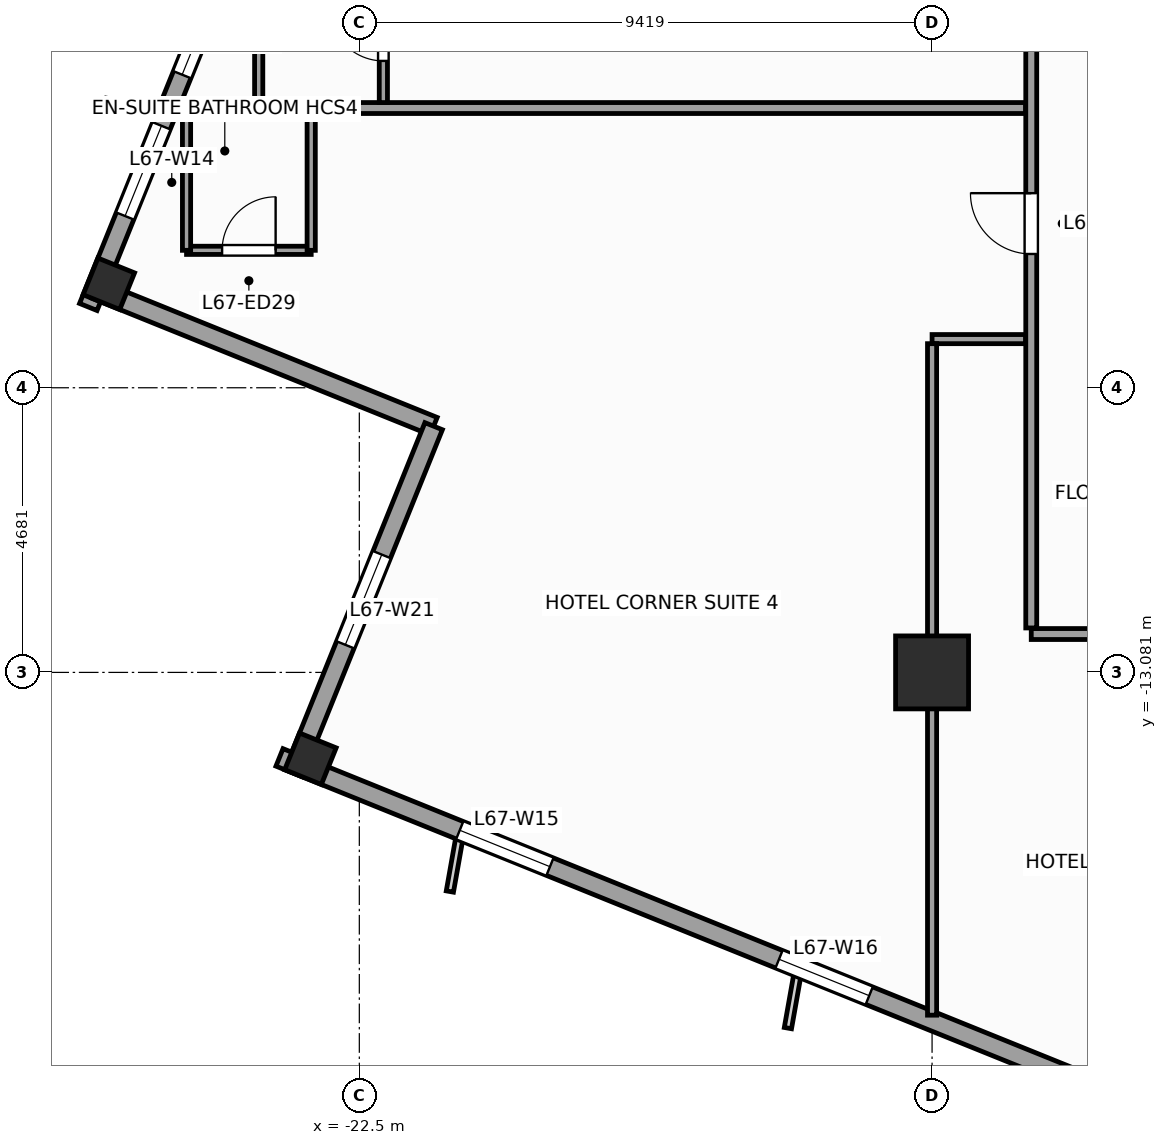
"""IFC4 building model, lengths in metres.
Left out: names, types, materials, properties, quantities, classifications, styles, units other than length and angle.
Written with IfcOpenShell. Run it as: python <this file> out.ifc"""

import sys

from ifc_helpers import new_model, si_unit, direction, frame, frame_2d, origin, origin_2d, place, context, subcontext, project, spatial, rectangle, extrude, source, transform, mapped, element, fill, save


model = new_model("IFC4")
c1 = context("Model", 3, precision=1e-05, world=origin(), true_north=direction((0.0, 1.0)))
c2 = subcontext(c1, "Body", "Model", "MODEL_VIEW")
j1 = project(units=[si_unit("LENGTHUNIT", "METRE"), si_unit("PLANEANGLEUNIT", "RADIAN")], contexts=[c1])
p1 = place(None, origin())
s1 = spatial("IfcSite", under=j1, at=p1, CompositionType="ELEMENT")
p2 = place(p1, origin())
s2 = spatial("IfcBuilding", under=s1, at=p2, CompositionType="ELEMENT")
p3 = place(p2, frame((0.0, 0.0, 276.0)))
s3 = spatial("IfcBuildingStorey", under=s2, at=p3, CompositionType="ELEMENT", Elevation=276.0)
m1 = source(origin(), c2, "Body", "SweptSolid", [
    extrude(rectangle(XDim=1.2, YDim=1.2, at=origin_2d()), origin(), (0.0, 0.0, 1.0), 3.6),
])
p4 = place(p3, frame((-13.081, -13.081, 0.0), z_axis=(0.0, 0.0, 1.0), x_axis=(1.0, 0.0, 0.0)))
e1 = element("IfcColumn", 1, at=p4, inside=s3, PredefinedType="COLUMN", context=c2, shape_type="MappedRepresentation", body=[
    mapped(m1, transform((0.0, 0.0, 0.0), scale=1.0)),
])
m2 = source(origin(), c2, "Body", "SweptSolid", [
    extrude(rectangle(XDim=0.65, YDim=0.65, at=origin_2d()), origin(), (0.0, 0.0, 1.0), 3.6),
])
for number, where, z_axis, x_axis in (
    (2, (-26.62, -6.69, 0.0), (0.0, 0.0, 1.0), (0.375, 0.927, 0.0)),
    (3, (-23.304, -14.501, 0.0), (0.0, 0.0, 1.0), (0.375, 0.927, 0.0)),
):
    element("IfcColumn", number, at=place(p3, frame(where, z_axis=z_axis, x_axis=x_axis)), inside=s3, PredefinedType="COLUMN", context=c2, shape_type="MappedRepresentation", body=[
        mapped(m2, transform((0.0, 0.0, 0.0), scale=1.0)),
    ])
p5 = place(p3, frame((-14.479, 23.813, 0.0), z_axis=(0.0, 0.0, 1.0), x_axis=(-0.374609557019, -0.927182657188, 0.0)))
e4 = element("IfcWall", 4, at=p5, inside=s3, PredefinedType="STANDARD", context=c2, shape_type="SweptSolid", body=[
    extrude(rectangle(XDim=33.31, YDim=0.31, at=frame_2d((16.655, 0.0))), origin(), (0.0, 0.0, 1.0), 2.75),
])
p6 = place(p5, frame((3.197, 0.0, 0.47)))
e5 = element("IfcOpeningElement", 5, at=p6, cuts=e4, PredefinedType="OPENING", context=c2, shape_type="SweptSolid", body=[
    extrude(rectangle(XDim=1.6, YDim=2.1, at=frame_2d((0.8, 1.05))), frame((0.0, 0.165, 0.0), z_axis=(0.0, -1.0, 0.0), x_axis=(1.0, 0.0, 0.0)), (0.0, 0.0, 1.0), 0.33),
])
p7 = place(p5, frame((8.86, 0.0, 0.47)))
e6 = element("IfcOpeningElement", 6, at=p7, cuts=e4, PredefinedType="OPENING", context=c2, shape_type="SweptSolid", body=[
    extrude(rectangle(XDim=1.6, YDim=2.1, at=frame_2d((0.8, 1.05))), frame((0.0, 0.165, 0.0), z_axis=(0.0, -1.0, 0.0), x_axis=(1.0, 0.0, 0.0)), (0.0, 0.0, 1.0), 0.33),
])
p8 = place(p5, frame((14.439, 0.0, 0.47)))
e7 = element("IfcOpeningElement", 7, at=p8, cuts=e4, PredefinedType="OPENING", context=c2, shape_type="SweptSolid", body=[
    extrude(rectangle(XDim=1.6, YDim=2.1, at=frame_2d((0.8, 1.05))), frame((0.0, 0.165, 0.0), z_axis=(0.0, -1.0, 0.0), x_axis=(1.0, 0.0, 0.0)), (0.0, 0.0, 1.0), 0.33),
])
p9 = place(p5, frame((23.351, 0.0, 0.47)))
e8 = element("IfcOpeningElement", 8, at=p9, cuts=e4, PredefinedType="OPENING", context=c2, shape_type="SweptSolid", body=[
    extrude(rectangle(XDim=1.6, YDim=2.1, at=frame_2d((0.8, 1.05))), frame((0.0, 0.165, 0.0), z_axis=(0.0, -1.0, 0.0), x_axis=(1.0, 0.0, 0.0)), (0.0, 0.0, 1.0), 0.33),
])
p10 = place(p5, frame((30.097, 0.0, 0.47)))
e9 = element("IfcOpeningElement", 9, at=p10, cuts=e4, PredefinedType="OPENING", context=c2, shape_type="SweptSolid", body=[
    extrude(rectangle(XDim=1.6, YDim=2.1, at=frame_2d((0.8, 1.05))), frame((0.0, 0.165, 0.0), z_axis=(0.0, -1.0, 0.0), x_axis=(1.0, 0.0, 0.0)), (0.0, 0.0, 1.0), 0.33),
])
p11 = place(p5, frame((27.59, 0.0, 0.47)))
e10 = element("IfcOpeningElement", 10, at=p11, cuts=e4, PredefinedType="OPENING", context=c2, shape_type="SweptSolid", body=[
    extrude(rectangle(XDim=1.6, YDim=2.1, at=frame_2d((0.8, 1.05))), frame((0.0, 0.165, 0.0), z_axis=(0.0, -1.0, 0.0), x_axis=(1.0, 0.0, 0.0)), (0.0, 0.0, 1.0), 0.33),
])
p12 = place(p3, frame((-26.841, -6.784, 0.0), z_axis=(0.0, 0.0, 1.0), x_axis=(0.927171722085, -0.374636620962, 0.0)))
e11 = element("IfcWall", 11, at=p12, inside=s3, PredefinedType="STANDARD", context=c2, shape_type="SweptSolid", body=[
    extrude(rectangle(XDim=6.0, YDim=0.31, at=frame_2d((3.0, 0.0))), origin(), (0.0, 0.0, 1.0), 2.65),
])
p13 = place(p3, frame((-21.278, -9.032, 0.0), z_axis=(0.0, 0.0, 1.0), x_axis=(-0.374602739196, -0.927185411764, 0.0)))
e12 = element("IfcWall", 12, at=p13, inside=s3, PredefinedType="STANDARD", context=c2, shape_type="SweptSolid", body=[
    extrude(rectangle(XDim=6.155, YDim=0.31, at=frame_2d((3.078, 0.0))), origin(), (0.0, 0.0, 1.0), 3.35),
])
p14 = place(p13, frame((2.278, 0.0, 0.47)))
e13 = element("IfcOpeningElement", 13, at=p14, cuts=e12, PredefinedType="OPENING", context=c2, shape_type="SweptSolid", body=[
    extrude(rectangle(XDim=1.6, YDim=2.1, at=frame_2d((0.8, 1.05))), frame((0.0, 0.165, 0.0), z_axis=(0.0, -1.0, 0.0), x_axis=(1.0, 0.0, 0.0)), (0.0, 0.0, 1.0), 0.33),
])
p15 = place(p3, frame((-23.813, -14.479, 0.0), z_axis=(0.0, 0.0, 1.0), x_axis=(0.927182657188, -0.374609557019, 0.0)))
e14 = element("IfcWall", 14, at=p15, inside=s3, PredefinedType="STANDARD", context=c2, shape_type="SweptSolid", body=[
    extrude(rectangle(XDim=33.31, YDim=0.31, at=frame_2d((16.655, 0.0))), origin(), (0.0, 0.0, 1.0), 2.75),
])
p16 = place(p15, frame((21.73, 0.0, 0.0)))
e15 = element("IfcOpeningElement", 15, at=p16, cuts=e14, PredefinedType="OPENING", context=c2, shape_type="SweptSolid", body=[
    extrude(rectangle(XDim=1.05, YDim=2.25, at=frame_2d((0.525, 1.125))), frame((0.0, 0.165, 0.0), z_axis=(0.0, -1.0, 0.0), x_axis=(1.0, 0.0, 0.0)), (0.0, 0.0, 1.0), 0.33),
])
p17 = place(p15, frame((3.197, 0.0, 0.47)))
e16 = element("IfcOpeningElement", 16, at=p17, cuts=e14, PredefinedType="OPENING", context=c2, shape_type="SweptSolid", body=[
    extrude(rectangle(XDim=1.6, YDim=2.1, at=frame_2d((0.8, 1.05))), frame((0.0, 0.165, 0.0), z_axis=(0.0, -1.0, 0.0), x_axis=(1.0, 0.0, 0.0)), (0.0, 0.0, 1.0), 0.33),
])
p18 = place(p15, frame((8.86, 0.0, 0.47)))
e17 = element("IfcOpeningElement", 17, at=p18, cuts=e14, PredefinedType="OPENING", context=c2, shape_type="SweptSolid", body=[
    extrude(rectangle(XDim=1.6, YDim=2.1, at=frame_2d((0.8, 1.05))), frame((0.0, 0.165, 0.0), z_axis=(0.0, -1.0, 0.0), x_axis=(1.0, 0.0, 0.0)), (0.0, 0.0, 1.0), 0.33),
])
p19 = place(p15, frame((14.439, 0.0, 0.47)))
e18 = element("IfcOpeningElement", 18, at=p19, cuts=e14, PredefinedType="OPENING", context=c2, shape_type="SweptSolid", body=[
    extrude(rectangle(XDim=1.6, YDim=2.1, at=frame_2d((0.8, 1.05))), frame((0.0, 0.165, 0.0), z_axis=(0.0, -1.0, 0.0), x_axis=(1.0, 0.0, 0.0)), (0.0, 0.0, 1.0), 0.33),
])
p20 = place(p15, frame((27.847, 0.0, 0.47)))
e19 = element("IfcOpeningElement", 19, at=p20, cuts=e14, PredefinedType="OPENING", context=c2, shape_type="SweptSolid", body=[
    extrude(rectangle(XDim=1.6, YDim=2.1, at=frame_2d((0.8, 1.05))), frame((0.0, 0.165, 0.0), z_axis=(0.0, -1.0, 0.0), x_axis=(1.0, 0.0, 0.0)), (0.0, 0.0, 1.0), 0.33),
])
p21 = place(p3, frame((-11.45, -12.45, 0.0), z_axis=(0.0, 0.0, 1.0), x_axis=(1.0, 0.0, 0.0)))
e20 = element("IfcWall", 20, at=p21, inside=s3, PredefinedType="PARTITIONING", context=c2, shape_type="SweptSolid", body=[
    extrude(rectangle(XDim=21.75, YDim=0.18, at=frame_2d((10.875, 0.0))), origin(), (0.0, 0.0, 1.0), 3.35),
])
p22 = place(p21, frame((12.436, 0.0, 0.0)))
e21 = element("IfcOpeningElement", 21, at=p22, cuts=e20, PredefinedType="OPENING", context=c2, shape_type="SweptSolid", body=[
    extrude(rectangle(XDim=0.95, YDim=2.1, at=frame_2d((0.475, 1.05))), frame((0.0, 0.1, 0.0), z_axis=(0.0, -1.0, 0.0), x_axis=(1.0, 0.0, 0.0)), (0.0, 0.0, 1.0), 0.2),
])
p23 = place(p21, frame((18.186, 0.0, 0.0)))
e22 = element("IfcOpeningElement", 22, at=p23, cuts=e20, PredefinedType="OPENING", context=c2, shape_type="SweptSolid", body=[
    extrude(rectangle(XDim=1.0, YDim=2.15, at=frame_2d((0.5, 1.075))), frame((0.0, 0.1, 0.0), z_axis=(0.0, -1.0, 0.0), x_axis=(1.0, 0.0, 0.0)), (0.0, 0.0, 1.0), 0.2),
])
p24 = place(p21, frame((14.5, 0.0, 0.0)))
e23 = element("IfcOpeningElement", 23, at=p24, cuts=e20, PredefinedType="OPENING", context=c2, shape_type="SweptSolid", body=[
    extrude(rectangle(XDim=1.0, YDim=2.15, at=frame_2d((0.5, 1.075))), frame((0.0, 0.1, 0.0), z_axis=(0.0, -1.0, 0.0), x_axis=(1.0, 0.0, 0.0)), (0.0, 0.0, 1.0), 0.2),
])
p25 = place(p21, frame((8.7, 0.0, 0.0)))
e24 = element("IfcOpeningElement", 24, at=p25, cuts=e20, PredefinedType="OPENING", context=c2, shape_type="SweptSolid", body=[
    extrude(rectangle(XDim=1.0, YDim=2.15, at=frame_2d((0.5, 1.075))), frame((0.0, 0.1, 0.0), z_axis=(0.0, -1.0, 0.0), x_axis=(1.0, 0.0, 0.0)), (0.0, 0.0, 1.0), 0.2),
])
p26 = place(p21, frame((3.139, 0.0, 0.0)))
e25 = element("IfcOpeningElement", 25, at=p26, cuts=e20, PredefinedType="OPENING", context=c2, shape_type="SweptSolid", body=[
    extrude(rectangle(XDim=1.0, YDim=2.15, at=frame_2d((0.5, 1.075))), frame((0.0, 0.1, 0.0), z_axis=(0.0, -1.0, 0.0), x_axis=(1.0, 0.0, 0.0)), (0.0, 0.0, 1.0), 0.2),
])
p27 = place(p3, frame((-11.45, -12.35, 0.0), z_axis=(0.0, 0.0, 1.0), x_axis=(0.0, 1.0, 0.0)))
e26 = element("IfcWall", 26, at=p27, inside=s3, PredefinedType="PARTITIONING", context=c2, shape_type="SweptSolid", body=[
    extrude(rectangle(XDim=23.7, YDim=0.18, at=frame_2d((11.85, 0.0))), origin(), (0.0, 0.0, 1.0), 3.35),
])
p28 = place(p27, frame((13.75, 0.0, 0.0)))
e27 = element("IfcOpeningElement", 27, at=p28, cuts=e26, PredefinedType="OPENING", context=c2, shape_type="SweptSolid", body=[
    extrude(rectangle(XDim=1.0, YDim=2.15, at=frame_2d((0.5, 1.075))), frame((0.0, 0.1, 0.0), z_axis=(0.0, -1.0, 0.0), x_axis=(1.0, 0.0, 0.0)), (0.0, 0.0, 1.0), 0.2),
])
p29 = place(p27, frame((17.55, 0.0, 0.0)))
e28 = element("IfcOpeningElement", 28, at=p29, cuts=e26, PredefinedType="OPENING", context=c2, shape_type="SweptSolid", body=[
    extrude(rectangle(XDim=1.0, YDim=2.15, at=frame_2d((0.5, 1.075))), frame((0.0, 0.1, 0.0), z_axis=(0.0, -1.0, 0.0), x_axis=(1.0, 0.0, 0.0)), (0.0, 0.0, 1.0), 0.2),
])
p30 = place(p27, frame((6.15, 0.0, 0.0)))
e29 = element("IfcOpeningElement", 29, at=p30, cuts=e26, PredefinedType="OPENING", context=c2, shape_type="SweptSolid", body=[
    extrude(rectangle(XDim=1.0, YDim=2.15, at=frame_2d((0.5, 1.075))), frame((0.0, 0.1, 0.0), z_axis=(0.0, -1.0, 0.0), x_axis=(1.0, 0.0, 0.0)), (0.0, 0.0, 1.0), 0.2),
])
p31 = place(p27, frame((9.95, 0.0, 0.0)))
e30 = element("IfcOpeningElement", 30, at=p31, cuts=e26, PredefinedType="OPENING", context=c2, shape_type="SweptSolid", body=[
    extrude(rectangle(XDim=1.0, YDim=2.15, at=frame_2d((0.5, 1.075))), frame((0.0, 0.1, 0.0), z_axis=(0.0, -1.0, 0.0), x_axis=(1.0, 0.0, 0.0)), (0.0, 0.0, 1.0), 0.2),
])
p32 = place(p3, frame((-11.545, -3.8, 0.0), z_axis=(0.0, 0.0, 1.0), x_axis=(-1.0, 0.0, 0.0)))
e31 = element("IfcWall", 31, at=p32, inside=s3, PredefinedType="PARTITIONING", context=c2, shape_type="SweptSolid", body=[
    extrude(rectangle(XDim=13.993, YDim=0.18, at=frame_2d((6.997, 0.0))), origin(), (0.0, 0.0, 1.0), 3.35),
])
p33 = place(p3, frame((-11.545, -7.6, 0.0), z_axis=(0.0, 0.0, 1.0), x_axis=(-1.0, 0.0, 0.0)))
e32 = element("IfcWall", 32, at=p33, inside=s3, PredefinedType="PARTITIONING", context=c2, shape_type="SweptSolid", body=[
    extrude(rectangle(XDim=1.536, YDim=0.15, at=frame_2d((0.768, 0.0))), origin(), (0.0, 0.0, 1.0), 3.35),
])
p34 = place(p3, frame((-13.081, -7.675, 0.0), z_axis=(0.0, 0.0, 1.0), x_axis=(0.0, -1.0, 0.0)))
e33 = element("IfcWall", 33, at=p34, inside=s3, PredefinedType="PARTITIONING", context=c2, shape_type="SweptSolid", body=[
    extrude(rectangle(XDim=11.043, YDim=0.15, at=frame_2d((5.521, 0.0))), origin(), (0.0, 0.0, 1.0), 2.45),
])
p35 = place(p3, frame((-25.342, -6.14, 0.0), z_axis=(0.0, 0.0, 1.0), x_axis=(1.0, 0.0, 0.0)))
e34 = element("IfcWall", 34, at=p35, inside=s3, PredefinedType="PARTITIONING", context=c2, shape_type="SweptSolid", body=[
    extrude(rectangle(XDim=2.05, YDim=0.135, at=frame_2d((1.025, 0.0))), origin(), (0.0, 0.0, 1.0), 3.35),
])
p36 = place(p35, frame((0.585, 0.0, 0.0)))
e35 = element("IfcOpeningElement", 35, at=p36, cuts=e34, PredefinedType="OPENING", context=c2, shape_type="SweptSolid", body=[
    extrude(rectangle(XDim=0.88, YDim=2.1, at=frame_2d((0.44, 1.05))), frame((0.0, 0.078, 0.0), z_axis=(0.0, -1.0, 0.0), x_axis=(1.0, 0.0, 0.0)), (0.0, 0.0, 1.0), 0.155),
])
p37 = place(p3, frame((-23.292, -6.14, 0.0), z_axis=(0.0, 0.0, 1.0), x_axis=(0.0, 1.0, 0.0)))
e36 = element("IfcWall", 36, at=p37, inside=s3, PredefinedType="PARTITIONING", context=c2, shape_type="SweptSolid", body=[
    extrude(rectangle(XDim=2.25, YDim=0.135, at=frame_2d((1.125, 0.0))), origin(), (0.0, 0.0, 1.0), 2.95),
])
p38 = place(p3, frame((-25.342, -6.14, 0.0), z_axis=(0.0, 0.0, 1.0), x_axis=(0.0, 1.0, 0.0)))
e37 = element("IfcWall", 37, at=p38, inside=s3, PredefinedType="PARTITIONING", context=c2, shape_type="SweptSolid", body=[
    extrude(rectangle(XDim=2.25, YDim=0.135, at=frame_2d((1.125, 0.0))), origin(), (0.0, 0.0, 1.0), 2.75),
])
p39 = place(p3, frame((-22.105, -3.71, 0.0), z_axis=(0.0, 0.0, 1.0), x_axis=(0.0, 1.0, 0.0)))
e38 = element("IfcWall", 38, at=p39, inside=s3, PredefinedType="PARTITIONING", context=c2, shape_type="SweptSolid", body=[
    extrude(rectangle(XDim=2.25, YDim=0.135, at=frame_2d((1.125, 0.0))), origin(), (0.0, 0.0, 1.0), 3.35),
])
p40 = place(p39, frame((0.685, 0.0, 0.0)))
e39 = element("IfcOpeningElement", 39, at=p40, cuts=e38, PredefinedType="OPENING", context=c2, shape_type="SweptSolid", body=[
    extrude(rectangle(XDim=0.88, YDim=2.1, at=frame_2d((0.44, 1.05))), frame((0.0, 0.078, 0.0), z_axis=(0.0, -1.0, 0.0), x_axis=(1.0, 0.0, 0.0)), (0.0, 0.0, 1.0), 0.155),
])
p41 = place(p3, frame((-24.155, -3.71, 0.0), z_axis=(0.0, 0.0, 1.0), x_axis=(0.0, 1.0, 0.0)))
e40 = element("IfcWall", 40, at=p41, inside=s3, PredefinedType="PARTITIONING", context=c2, shape_type="SweptSolid", body=[
    extrude(rectangle(XDim=2.25, YDim=0.135, at=frame_2d((1.125, 0.0))), origin(), (0.0, 0.0, 1.0), 3.35),
])
m3 = source(origin(), c2, "Body", "SweptSolid", [
    extrude(rectangle(XDim=1.6, YDim=2.1, at=frame_2d((0.8, 1.05))), frame((0.0, 0.03, 0.0), z_axis=(0.0, -1.0, 0.0), x_axis=(1.0, 0.0, 0.0)), (0.0, 0.0, 1.0), 0.06),
])
p42 = place(p10, origin())
e41 = element("IfcWindow", 41, at=p42, inside=s3, PartitioningType="SINGLE_PANEL", PredefinedType="WINDOW", context=c2, shape_type="MappedRepresentation", body=[
    mapped(m3, transform((0.0, 0.0, 0.0), scale=1.0)),
])
fill(e9, e41)
p43 = place(p17, origin())
e42 = element("IfcWindow", 42, at=p43, inside=s3, PartitioningType="SINGLE_PANEL", PredefinedType="WINDOW", context=c2, shape_type="MappedRepresentation", body=[
    mapped(m3, transform((0.0, 0.0, 0.0), scale=1.0)),
])
fill(e16, e42)
p44 = place(p18, origin())
e43 = element("IfcWindow", 43, at=p44, inside=s3, PartitioningType="SINGLE_PANEL", PredefinedType="WINDOW", context=c2, shape_type="MappedRepresentation", body=[
    mapped(m3, transform((0.0, 0.0, 0.0), scale=1.0)),
])
fill(e17, e43)
p45 = place(p14, origin())
e44 = element("IfcWindow", 44, at=p45, inside=s3, PartitioningType="SINGLE_PANEL", PredefinedType="WINDOW", context=c2, shape_type="MappedRepresentation", body=[
    mapped(m3, transform((0.0, 0.0, 0.0), scale=1.0)),
])
fill(e13, e44)
m4 = source(origin(), c2, "Body", "SweptSolid", [
    extrude(rectangle(XDim=1.0, YDim=2.15, at=frame_2d((0.5, 1.075))), frame((0.0, 0.025, 0.0), z_axis=(0.0, -1.0, 0.0), x_axis=(1.0, 0.0, 0.0)), (0.0, 0.0, 1.0), 0.05),
])
p46 = place(p30, origin())
e45 = element("IfcDoor", 45, at=p46, inside=s3, OperationType="SINGLE_SWING_RIGHT", PredefinedType="DOOR", context=c2, shape_type="MappedRepresentation", body=[
    mapped(m4, transform((0.0, 0.0, 0.0), scale=1.0)),
])
fill(e29, e45)
m5 = source(origin(), c2, "Body", "SweptSolid", [
    extrude(rectangle(XDim=0.88, YDim=2.1, at=frame_2d((0.44, 1.05))), frame((0.0, 0.025, 0.0), z_axis=(0.0, -1.0, 0.0), x_axis=(1.0, 0.0, 0.0)), (0.0, 0.0, 1.0), 0.05),
])
p47 = place(p36, origin())
e46 = element("IfcDoor", 46, at=p47, inside=s3, OperationType="SINGLE_SWING_RIGHT", PredefinedType="DOOR", context=c2, shape_type="MappedRepresentation", body=[
    mapped(m5, transform((0.0, 0.0, 0.0), scale=1.0)),
])
fill(e35, e46)
p48 = place(p40, origin())
e47 = element("IfcDoor", 47, at=p48, inside=s3, OperationType="SINGLE_SWING_RIGHT", PredefinedType="DOOR", context=c2, shape_type="MappedRepresentation", body=[
    mapped(m5, transform((0.0, 0.0, 0.0), scale=1.0)),
])
fill(e39, e47)
p49 = place(p11, origin())
e48 = element("IfcWindow", 48, at=p49, inside=s3, PartitioningType="SINGLE_PANEL", PredefinedType="WINDOW", context=c2, shape_type="MappedRepresentation", body=[
    mapped(m3, transform((0.0, 0.0, 0.0), scale=1.0)),
])
fill(e10, e48)
save(model, sys.argv[1])
